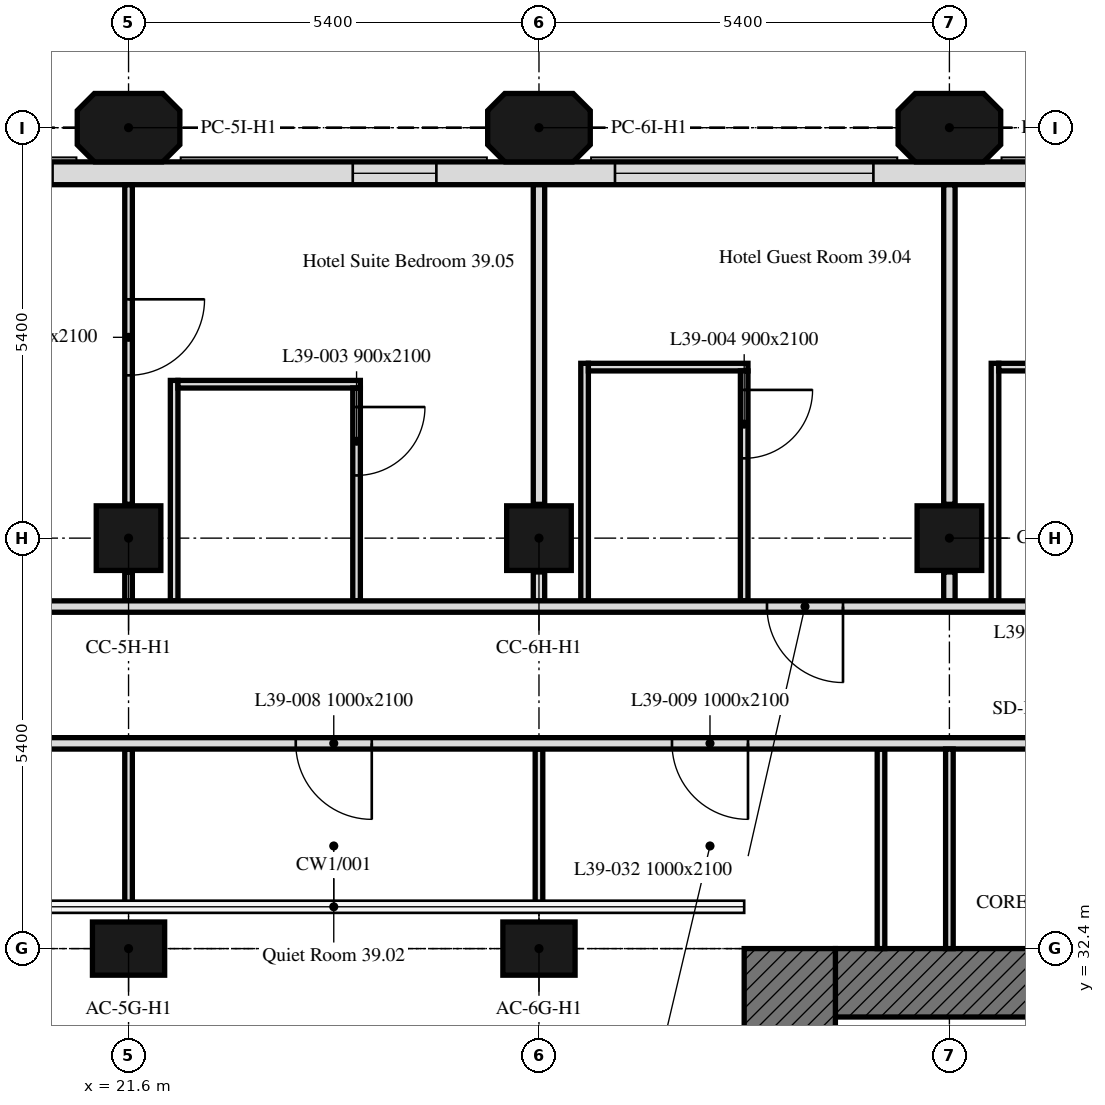
"""IFC4 building model, lengths in metres.
Left out: names, types, materials, properties, quantities, classifications, styles, units other than length and angle.
Written with IfcOpenShell. Run it as: python <this file> out.ifc"""

import sys

from ifc_helpers import new_model, si_unit, direction, frame, frame_2d, origin, origin_2d, place, context, subcontext, project, spatial, polyline, rectangle, outline, extrude, element, fill, save


model = new_model("IFC4")
c1 = context("Model", 3, precision=1e-05, world=origin(), true_north=direction((0.0, 1.0)))
c2 = subcontext(c1, "Body", "Model", "MODEL_VIEW")
j1 = project(units=[si_unit("LENGTHUNIT", "METRE"), si_unit("PLANEANGLEUNIT", "RADIAN")], contexts=[c1])
p1 = place(None, origin())
s1 = spatial("IfcSite", under=j1, at=p1, CompositionType="ELEMENT")
p2 = place(p1, origin())
s2 = spatial("IfcBuilding", under=s1, at=p2, CompositionType="ELEMENT")
p3 = place(p2, frame((0.0, 0.0, 166.0)))
s3 = spatial("IfcBuildingStorey", under=s2, at=p3, CompositionType="ELEMENT", Elevation=166.0)
for number, where, z_axis, x_axis in (
    (1, (21.6, 32.4, 0.0), (0.0, 0.0, 1.0), (1.0, 0.0, 0.0)),
    (2, (27.0, 32.4, 0.0), (0.0, 0.0, 1.0), (1.0, 0.0, 0.0)),
):
    element("IfcColumn", number, at=place(p3, frame(where, z_axis=z_axis, x_axis=x_axis)), inside=s3, PredefinedType="COLUMN", context=c2, shape_type="SweptSolid", body=[
        extrude(rectangle(XDim=0.95, YDim=0.7, at=origin_2d()), origin(), (0.0, 0.0, 1.0), 3.0),
    ])
for number, where, z_axis, x_axis in (
    (3, (21.6, 37.8, 0.0), (0.0, 0.0, 1.0), (1.0, 0.0, 0.0)),
    (4, (27.0, 37.8, 0.0), (0.0, 0.0, 1.0), (1.0, 0.0, 0.0)),
    (5, (32.4, 37.8, 0.0), (0.0, 0.0, 1.0), (1.0, 0.0, 0.0)),
):
    element("IfcColumn", number, at=place(p3, frame(where, z_axis=z_axis, x_axis=x_axis)), inside=s3, PredefinedType="COLUMN", context=c2, shape_type="SweptSolid", body=[
        extrude(rectangle(XDim=0.85, YDim=0.85, at=origin_2d()), origin(), (0.0, 0.0, 1.0), 3.0),
    ])
for number, where, z_axis, x_axis in (
    (6, (21.6, 43.2, 0.0), (0.0, 0.0, 1.0), (1.0, 0.0, 0.0)),
    (7, (27.0, 43.2, 0.0), (0.0, 0.0, 1.0), (1.0, 0.0, 0.0)),
    (8, (32.4, 43.2, 0.0), (0.0, 0.0, 1.0), (1.0, 0.0, 0.0)),
):
    element("IfcColumn", number, at=place(p3, frame(where, z_axis=z_axis, x_axis=x_axis)), inside=s3, PredefinedType="COLUMN", context=c2, shape_type="SweptSolid", body=[
        extrude(outline(polyline([(-0.45, -0.45), (0.45, -0.45), (0.675, -0.225), (0.675, 0.225), (0.45, 0.45), (-0.45, 0.45), (-0.675, 0.225), (-0.675, -0.225), (-0.45, -0.45)])), origin(), (0.0, 0.0, 1.0), 3.0),
    ])
p4 = place(p3, frame((43.014, 42.6, 0.0), z_axis=(0.0, 0.0, 1.0), x_axis=(-1.0, 0.0, 0.0)))
e9 = element("IfcWall", 9, at=p4, inside=s3, PredefinedType="SOLIDWALL", context=c2, shape_type="SweptSolid", body=[
    extrude(rectangle(XDim=32.027, YDim=0.3, at=frame_2d((16.014, 0.0))), origin(), (0.0, 0.0, 1.0), 3.0),
])
p5 = place(p4, frame((0.814, 0.0, 0.9)))
e10 = element("IfcOpeningElement", 10, at=p5, cuts=e9, PredefinedType="OPENING", context=c2, shape_type="SweptSolid", body=[
    extrude(rectangle(XDim=3.4, YDim=1.7, at=frame_2d((1.7, 0.85))), frame((0.0, 0.16, 0.0), z_axis=(0.0, -1.0, 0.0), x_axis=(1.0, 0.0, 0.0)), (0.0, 0.0, 1.0), 0.32),
])
p6 = place(p4, frame((6.564, 0.0, 0.9)))
e11 = element("IfcOpeningElement", 11, at=p6, cuts=e9, PredefinedType="OPENING", context=c2, shape_type="SweptSolid", body=[
    extrude(rectangle(XDim=1.1, YDim=1.7, at=frame_2d((0.55, 0.85))), frame((0.0, 0.16, 0.0), z_axis=(0.0, -1.0, 0.0), x_axis=(1.0, 0.0, 0.0)), (0.0, 0.0, 1.0), 0.32),
])
p7 = place(p4, frame((11.614, 0.0, 0.9)))
e12 = element("IfcOpeningElement", 12, at=p7, cuts=e9, PredefinedType="OPENING", context=c2, shape_type="SweptSolid", body=[
    extrude(rectangle(XDim=3.4, YDim=1.7, at=frame_2d((1.7, 0.85))), frame((0.0, 0.16, 0.0), z_axis=(0.0, -1.0, 0.0), x_axis=(1.0, 0.0, 0.0)), (0.0, 0.0, 1.0), 0.32),
])
p8 = place(p4, frame((17.364, 0.0, 0.9)))
e13 = element("IfcOpeningElement", 13, at=p8, cuts=e9, PredefinedType="OPENING", context=c2, shape_type="SweptSolid", body=[
    extrude(rectangle(XDim=1.1, YDim=1.7, at=frame_2d((0.55, 0.85))), frame((0.0, 0.16, 0.0), z_axis=(0.0, -1.0, 0.0), x_axis=(1.0, 0.0, 0.0)), (0.0, 0.0, 1.0), 0.32),
])
p9 = place(p4, frame((22.414, 0.0, 0.9)))
e14 = element("IfcOpeningElement", 14, at=p9, cuts=e9, PredefinedType="OPENING", context=c2, shape_type="SweptSolid", body=[
    extrude(rectangle(XDim=3.4, YDim=1.7, at=frame_2d((1.7, 0.85))), frame((0.0, 0.16, 0.0), z_axis=(0.0, -1.0, 0.0), x_axis=(1.0, 0.0, 0.0)), (0.0, 0.0, 1.0), 0.32),
])
p10 = place(p4, frame((28.164, 0.0, 0.9)))
e15 = element("IfcOpeningElement", 15, at=p10, cuts=e9, PredefinedType="OPENING", context=c2, shape_type="SweptSolid", body=[
    extrude(rectangle(XDim=1.1, YDim=1.7, at=frame_2d((0.55, 0.85))), frame((0.0, 0.16, 0.0), z_axis=(0.0, -1.0, 0.0), x_axis=(1.0, 0.0, 0.0)), (0.0, 0.0, 1.0), 0.32),
])
p11 = place(p3, frame((30.9, 31.95, 0.0), z_axis=(0.0, 0.0, 1.0), x_axis=(1.0, 0.0, 0.0)))
e16 = element("IfcWall", 16, at=p11, inside=s3, PredefinedType="SOLIDWALL", context=c2, shape_type="SweptSolid", body=[
    extrude(rectangle(XDim=11.1, YDim=0.9, at=frame_2d((5.55, 0.0))), origin(), (0.0, 0.0, 1.0), 3.0),
])
p12 = place(p11, frame((5.55, 0.0, 0.0)))
e17 = element("IfcOpeningElement", 17, at=p12, cuts=e16, PredefinedType="OPENING", context=c2, shape_type="SweptSolid", body=[
    extrude(rectangle(XDim=2.0, YDim=2.4, at=frame_2d((1.0, 1.2))), frame((0.0, 0.45, 0.0), z_axis=(0.0, -1.0, 0.0), x_axis=(1.0, 0.0, 0.0)), (0.0, 0.0, 1.0), 0.9),
])
p13 = place(p3, frame((30.3, 16.2, 0.0), z_axis=(0.0, 0.0, 1.0), x_axis=(0.0, 1.0, 0.0)))
e18 = element("IfcWall", 18, at=p13, inside=s3, PredefinedType="SOLIDWALL", context=c2, shape_type="SweptSolid", body=[
    extrude(rectangle(XDim=16.2, YDim=1.2, at=frame_2d((8.1, 0.0))), origin(), (0.0, 0.0, 1.0), 3.0),
])
p14 = place(p3, frame((21.6, 42.449, 0.0), z_axis=(0.0, 0.0, 1.0), x_axis=(0.0, -1.0, 0.0)))
e19 = element("IfcWall", 19, at=p14, inside=s3, PredefinedType="PARTITIONING", context=c2, shape_type="SweptSolid", body=[
    extrude(rectangle(XDim=4.204, YDim=0.1, at=frame_2d((2.102, 0.0))), origin(), (0.0, 0.0, 1.0), 3.0),
])
p15 = place(p14, frame((1.507, 0.0, 0.0)))
e20 = element("IfcOpeningElement", 20, at=p15, cuts=e19, PredefinedType="OPENING", context=c2, shape_type="SweptSolid", body=[
    extrude(rectangle(XDim=1.0, YDim=2.1, at=frame_2d((0.5, 1.05))), frame((0.0, 0.05, 0.0), z_axis=(0.0, -1.0, 0.0), x_axis=(1.0, 0.0, 0.0)), (0.0, 0.0, 1.0), 0.1),
])
p16 = place(p3, frame((21.6, 37.355, 0.0), z_axis=(0.0, 0.0, 1.0), x_axis=(0.0, -1.0, 0.0)))
e21 = element("IfcWall", 21, at=p16, inside=s3, PredefinedType="PARTITIONING", context=c2, shape_type="SweptSolid", body=[
    extrude(rectangle(XDim=0.38, YDim=0.1, at=frame_2d((0.19, 0.0))), origin(), (0.0, 0.0, 1.0), 3.0),
])
p17 = place(p3, frame((22.2, 36.975, 0.0), z_axis=(0.0, 0.0, 1.0), x_axis=(0.0, 1.0, 0.0)))
e22 = element("IfcWall", 22, at=p17, inside=s3, PredefinedType="PARTITIONING", context=c2, shape_type="SweptSolid", body=[
    extrude(rectangle(XDim=2.9, YDim=0.1, at=frame_2d((1.45, 0.0))), origin(), (0.0, 0.0, 1.0), 3.0),
])
p18 = place(p3, frame((22.25, 39.825, 0.0), z_axis=(0.0, 0.0, 1.0), x_axis=(1.0, 0.0, 0.0)))
e23 = element("IfcWall", 23, at=p18, inside=s3, PredefinedType="PARTITIONING", context=c2, shape_type="SweptSolid", body=[
    extrude(rectangle(XDim=2.4, YDim=0.1, at=frame_2d((1.2, 0.0))), origin(), (0.0, 0.0, 1.0), 3.0),
])
p19 = place(p3, frame((24.6, 39.775, 0.0), z_axis=(0.0, 0.0, 1.0), x_axis=(0.0, -1.0, 0.0)))
e24 = element("IfcWall", 24, at=p19, inside=s3, PredefinedType="PARTITIONING", context=c2, shape_type="SweptSolid", body=[
    extrude(rectangle(XDim=2.8, YDim=0.1, at=frame_2d((1.4, 0.0))), origin(), (0.0, 0.0, 1.0), 3.0),
])
p20 = place(p19, frame((0.25, 0.0, 0.0)))
e25 = element("IfcOpeningElement", 25, at=p20, cuts=e24, PredefinedType="OPENING", context=c2, shape_type="SweptSolid", body=[
    extrude(rectangle(XDim=0.9, YDim=2.1, at=frame_2d((0.45, 1.05))), frame((0.0, 0.05, 0.0), z_axis=(0.0, -1.0, 0.0), x_axis=(1.0, 0.0, 0.0)), (0.0, 0.0, 1.0), 0.1),
])
p21 = place(p3, frame((27.0, 36.975, 0.0), z_axis=(0.0, 0.0, 1.0), x_axis=(0.0, 1.0, 0.0)))
e26 = element("IfcWall", 26, at=p21, inside=s3, PredefinedType="PARTITIONING", context=c2, shape_type="SweptSolid", body=[
    extrude(rectangle(XDim=0.38, YDim=0.15, at=frame_2d((0.19, 0.0))), origin(), (0.0, 0.0, 1.0), 3.0),
])
p22 = place(p3, frame((27.0, 38.245, 0.0), z_axis=(0.0, 0.0, 1.0), x_axis=(0.0, 1.0, 0.0)))
e27 = element("IfcWall", 27, at=p22, inside=s3, PredefinedType="PARTITIONING", context=c2, shape_type="SweptSolid", body=[
    extrude(rectangle(XDim=4.204, YDim=0.15, at=frame_2d((2.102, 0.0))), origin(), (0.0, 0.0, 1.0), 3.0),
])
p23 = place(p3, frame((27.6, 36.975, 0.0), z_axis=(0.0, 0.0, 1.0), x_axis=(0.0, 1.0, 0.0)))
e28 = element("IfcWall", 28, at=p23, inside=s3, PredefinedType="PARTITIONING", context=c2, shape_type="SweptSolid", body=[
    extrude(rectangle(XDim=3.125, YDim=0.1, at=frame_2d((1.562, 0.0))), origin(), (0.0, 0.0, 1.0), 3.0),
])
p24 = place(p3, frame((27.65, 40.05, 0.0), z_axis=(0.0, 0.0, 1.0), x_axis=(1.0, 0.0, 0.0)))
e29 = element("IfcWall", 29, at=p24, inside=s3, PredefinedType="PARTITIONING", context=c2, shape_type="SweptSolid", body=[
    extrude(rectangle(XDim=2.1, YDim=0.1, at=frame_2d((1.05, 0.0))), origin(), (0.0, 0.0, 1.0), 3.0),
])
p25 = place(p3, frame((29.7, 40.0, 0.0), z_axis=(0.0, 0.0, 1.0), x_axis=(0.0, -1.0, 0.0)))
e30 = element("IfcWall", 30, at=p25, inside=s3, PredefinedType="PARTITIONING", context=c2, shape_type="SweptSolid", body=[
    extrude(rectangle(XDim=3.025, YDim=0.1, at=frame_2d((1.512, 0.0))), origin(), (0.0, 0.0, 1.0), 3.0),
])
p26 = place(p25, frame((0.25, 0.0, 0.0)))
e31 = element("IfcOpeningElement", 31, at=p26, cuts=e30, PredefinedType="OPENING", context=c2, shape_type="SweptSolid", body=[
    extrude(rectangle(XDim=0.9, YDim=2.1, at=frame_2d((0.45, 1.05))), frame((0.0, 0.05, 0.0), z_axis=(0.0, -1.0, 0.0), x_axis=(1.0, 0.0, 0.0)), (0.0, 0.0, 1.0), 0.1),
])
p27 = place(p3, frame((32.4, 36.975, 0.0), z_axis=(0.0, 0.0, 1.0), x_axis=(0.0, 1.0, 0.0)))
e32 = element("IfcWall", 32, at=p27, inside=s3, PredefinedType="PARTITIONING", context=c2, shape_type="SweptSolid", body=[
    extrude(rectangle(XDim=0.38, YDim=0.15, at=frame_2d((0.19, 0.0))), origin(), (0.0, 0.0, 1.0), 3.0),
])
p28 = place(p3, frame((32.4, 38.245, 0.0), z_axis=(0.0, 0.0, 1.0), x_axis=(0.0, 1.0, 0.0)))
e33 = element("IfcWall", 33, at=p28, inside=s3, PredefinedType="PARTITIONING", context=c2, shape_type="SweptSolid", body=[
    extrude(rectangle(XDim=4.204, YDim=0.15, at=frame_2d((2.102, 0.0))), origin(), (0.0, 0.0, 1.0), 3.0),
])
p29 = place(p3, frame((33.0, 36.975, 0.0), z_axis=(0.0, 0.0, 1.0), x_axis=(0.0, 1.0, 0.0)))
e34 = element("IfcWall", 34, at=p29, inside=s3, PredefinedType="PARTITIONING", context=c2, shape_type="SweptSolid", body=[
    extrude(rectangle(XDim=3.125, YDim=0.1, at=frame_2d((1.562, 0.0))), origin(), (0.0, 0.0, 1.0), 3.0),
])
p30 = place(p3, frame((33.05, 40.05, 0.0), z_axis=(0.0, 0.0, 1.0), x_axis=(1.0, 0.0, 0.0)))
e35 = element("IfcWall", 35, at=p30, inside=s3, PredefinedType="PARTITIONING", context=c2, shape_type="SweptSolid", body=[
    extrude(rectangle(XDim=2.1, YDim=0.1, at=frame_2d((1.05, 0.0))), origin(), (0.0, 0.0, 1.0), 3.0),
])
p31 = place(p3, frame((47.849, 36.9, 0.0), z_axis=(0.0, 0.0, 1.0), x_axis=(-1.0, 0.0, 0.0)))
e36 = element("IfcWall", 36, at=p31, inside=s3, PredefinedType="PARTITIONING", context=c2, shape_type="SweptSolid", body=[
    extrude(rectangle(XDim=41.698, YDim=0.15, at=frame_2d((20.849, 0.0))), origin(), (0.0, 0.0, 1.0), 3.0),
])
p32 = place(p31, frame((39.249, 0.0, 0.0)))
e37 = element("IfcOpeningElement", 37, at=p32, cuts=e36, PredefinedType="OPENING", context=c2, shape_type="SweptSolid", body=[
    extrude(rectangle(XDim=1.0, YDim=2.1, at=frame_2d((0.5, 1.05))), frame((0.0, 0.075, 0.0), z_axis=(0.0, -1.0, 0.0), x_axis=(1.0, 0.0, 0.0)), (0.0, 0.0, 1.0), 0.15),
])
p33 = place(p31, frame((28.449, 0.0, 0.0)))
e38 = element("IfcOpeningElement", 38, at=p33, cuts=e36, PredefinedType="OPENING", context=c2, shape_type="SweptSolid", body=[
    extrude(rectangle(XDim=1.0, YDim=2.1, at=frame_2d((0.5, 1.05))), frame((0.0, 0.075, 0.0), z_axis=(0.0, -1.0, 0.0), x_axis=(1.0, 0.0, 0.0)), (0.0, 0.0, 1.0), 0.15),
])
p34 = place(p31, frame((16.849, 0.0, 0.0)))
e39 = element("IfcOpeningElement", 39, at=p34, cuts=e36, PredefinedType="OPENING", context=c2, shape_type="SweptSolid", body=[
    extrude(rectangle(XDim=1.0, YDim=2.1, at=frame_2d((0.5, 1.05))), frame((0.0, 0.075, 0.0), z_axis=(0.0, -1.0, 0.0), x_axis=(1.0, 0.0, 0.0)), (0.0, 0.0, 1.0), 0.15),
])
p35 = place(p31, frame((11.449, 0.0, 0.0)))
e40 = element("IfcOpeningElement", 40, at=p35, cuts=e36, PredefinedType="OPENING", context=c2, shape_type="SweptSolid", body=[
    extrude(rectangle(XDim=1.0, YDim=2.1, at=frame_2d((0.5, 1.05))), frame((0.0, 0.075, 0.0), z_axis=(0.0, -1.0, 0.0), x_axis=(1.0, 0.0, 0.0)), (0.0, 0.0, 1.0), 0.15),
])
p36 = place(p31, frame((2.744, 0.0, 0.0)))
e41 = element("IfcOpeningElement", 41, at=p36, cuts=e36, PredefinedType="OPENING", context=c2, shape_type="SweptSolid", body=[
    extrude(rectangle(XDim=1.0, YDim=2.1, at=frame_2d((0.5, 1.05))), frame((0.0, 0.075, 0.0), z_axis=(0.0, -1.0, 0.0), x_axis=(1.0, 0.0, 0.0)), (0.0, 0.0, 1.0), 0.15),
])
for number, where, z_axis, x_axis in (
    (42, (21.6, 35.025, 0.0), (0.0, 0.0, 1.0), (0.0, -1.0, 0.0)),
    (43, (27.0, 32.895, 0.0), (0.0, 0.0, 1.0), (0.0, 1.0, 0.0)),
):
    element("IfcWall", number, at=place(p3, frame(where, z_axis=z_axis, x_axis=x_axis)), inside=s3, PredefinedType="PARTITIONING", context=c2, shape_type="SweptSolid", body=[
        extrude(rectangle(XDim=2.13, YDim=0.1, at=frame_2d((1.065, 0.0))), origin(), (0.0, 0.0, 1.0), 3.0),
    ])
p37 = place(p3, frame((31.5, 32.4, 0.0), z_axis=(0.0, 0.0, 1.0), x_axis=(0.0, 1.0, 0.0)))
e44 = element("IfcWall", 44, at=p37, inside=s3, PredefinedType="PARTITIONING", context=c2, shape_type="SweptSolid", body=[
    extrude(rectangle(XDim=2.625, YDim=0.1, at=frame_2d((1.312, 0.0))), origin(), (0.0, 0.0, 1.0), 3.0),
])
p38 = place(p3, frame((43.275, 35.1, 0.0), z_axis=(0.0, 0.0, 1.0), x_axis=(-1.0, 0.0, 0.0)))
e45 = element("IfcWall", 45, at=p38, inside=s3, PredefinedType="PARTITIONING", context=c2, shape_type="SweptSolid", body=[
    extrude(rectangle(XDim=37.124, YDim=0.15, at=frame_2d((18.562, 0.0))), origin(), (0.0, 0.0, 1.0), 3.0),
])
p39 = place(p38, frame((24.775, 0.0, 0.0)))
e46 = element("IfcOpeningElement", 46, at=p39, cuts=e45, PredefinedType="OPENING", context=c2, shape_type="SweptSolid", body=[
    extrude(rectangle(XDim=1.0, YDim=2.1, at=frame_2d((0.5, 1.05))), frame((0.0, 0.075, 0.0), z_axis=(0.0, -1.0, 0.0), x_axis=(1.0, 0.0, 0.0)), (0.0, 0.0, 1.0), 0.15),
])
p40 = place(p38, frame((18.475, 0.0, 0.0)))
e47 = element("IfcOpeningElement", 47, at=p40, cuts=e45, PredefinedType="OPENING", context=c2, shape_type="SweptSolid", body=[
    extrude(rectangle(XDim=1.0, YDim=2.1, at=frame_2d((0.5, 1.05))), frame((0.0, 0.075, 0.0), z_axis=(0.0, -1.0, 0.0), x_axis=(1.0, 0.0, 0.0)), (0.0, 0.0, 1.0), 0.15),
])
p41 = place(p38, frame((13.525, 0.0, 0.0)))
e48 = element("IfcOpeningElement", 48, at=p41, cuts=e45, PredefinedType="OPENING", context=c2, shape_type="SweptSolid", body=[
    extrude(rectangle(XDim=1.0, YDim=2.1, at=frame_2d((0.5, 1.05))), frame((0.0, 0.075, 0.0), z_axis=(0.0, -1.0, 0.0), x_axis=(1.0, 0.0, 0.0)), (0.0, 0.0, 1.0), 0.15),
])
p42 = place(p38, frame((34.095, 0.0, 0.0)))
e49 = element("IfcOpeningElement", 49, at=p42, cuts=e45, PredefinedType="OPENING", context=c2, shape_type="SweptSolid", body=[
    extrude(rectangle(XDim=1.0, YDim=2.1, at=frame_2d((0.5, 1.05))), frame((0.0, 0.075, 0.0), z_axis=(0.0, -1.0, 0.0), x_axis=(1.0, 0.0, 0.0)), (0.0, 0.0, 1.0), 0.15),
])
p43 = place(p38, frame((8.75, 0.0, 0.0)))
e50 = element("IfcOpeningElement", 50, at=p43, cuts=e45, PredefinedType="OPENING", context=c2, shape_type="SweptSolid", body=[
    extrude(rectangle(XDim=1.0, YDim=2.1, at=frame_2d((0.5, 1.05))), frame((0.0, 0.075, 0.0), z_axis=(0.0, -1.0, 0.0), x_axis=(1.0, 0.0, 0.0)), (0.0, 0.0, 1.0), 0.15),
])
p44 = place(p38, frame((1.55, 0.0, 0.0)))
e51 = element("IfcOpeningElement", 51, at=p44, cuts=e45, PredefinedType="OPENING", context=c2, shape_type="SweptSolid", body=[
    extrude(rectangle(XDim=1.0, YDim=2.1, at=frame_2d((0.5, 1.05))), frame((0.0, 0.075, 0.0), z_axis=(0.0, -1.0, 0.0), x_axis=(1.0, 0.0, 0.0)), (0.0, 0.0, 1.0), 0.15),
])
p45 = place(p38, frame((28.2, 0.0, 0.0)))
e52 = element("IfcOpeningElement", 52, at=p45, cuts=e45, PredefinedType="OPENING", context=c2, shape_type="SweptSolid", body=[
    extrude(rectangle(XDim=1.0, YDim=2.1, at=frame_2d((0.5, 1.05))), frame((0.0, 0.075, 0.0), z_axis=(0.0, -1.0, 0.0), x_axis=(1.0, 0.0, 0.0)), (0.0, 0.0, 1.0), 0.15),
])
p46 = place(p38, frame((30.625, 0.0, 0.0)))
e53 = element("IfcOpeningElement", 53, at=p46, cuts=e45, PredefinedType="OPENING", context=c2, shape_type="SweptSolid", body=[
    extrude(rectangle(XDim=1.8, YDim=2.4, at=frame_2d((0.9, 1.2))), frame((0.0, 0.075, 0.0), z_axis=(0.0, -1.0, 0.0), x_axis=(1.0, 0.0, 0.0)), (0.0, 0.0, 1.0), 0.15),
])
p47 = place(p38, frame((5.525, 0.0, 0.0)))
e54 = element("IfcOpeningElement", 54, at=p47, cuts=e45, PredefinedType="OPENING", context=c2, shape_type="SweptSolid", body=[
    extrude(rectangle(XDim=1.8, YDim=2.4, at=frame_2d((0.9, 1.2))), frame((0.0, 0.075, 0.0), z_axis=(0.0, -1.0, 0.0), x_axis=(1.0, 0.0, 0.0)), (0.0, 0.0, 1.0), 0.15),
])
p48 = place(p3, frame((32.4, 35.025, 0.0), z_axis=(0.0, 0.0, 1.0), x_axis=(0.0, -1.0, 0.0)))
e55 = element("IfcWall", 55, at=p48, inside=s3, PredefinedType="PARTITIONING", context=c2, shape_type="SweptSolid", body=[
    extrude(rectangle(XDim=2.625, YDim=0.1, at=frame_2d((1.312, 0.0))), origin(), (0.0, 0.0, 1.0), 3.0),
])
p49 = place(p7, origin())
e56 = element("IfcWindow", 56, at=p49, inside=s3, PartitioningType="SINGLE_PANEL", PredefinedType="WINDOW", context=c2, shape_type="SweptSolid", body=[
    extrude(rectangle(XDim=3.4, YDim=1.7, at=frame_2d((1.7, 0.85))), frame((0.0, 0.03, 0.0), z_axis=(0.0, -1.0, 0.0), x_axis=(1.0, 0.0, 0.0)), (0.0, 0.0, 1.0), 0.06),
])
fill(e12, e56)
p50 = place(p8, origin())
e57 = element("IfcWindow", 57, at=p50, inside=s3, PartitioningType="SINGLE_PANEL", PredefinedType="WINDOW", context=c2, shape_type="SweptSolid", body=[
    extrude(rectangle(XDim=1.1, YDim=1.7, at=frame_2d((0.55, 0.85))), frame((0.0, 0.03, 0.0), z_axis=(0.0, -1.0, 0.0), x_axis=(1.0, 0.0, 0.0)), (0.0, 0.0, 1.0), 0.06),
])
fill(e13, e57)
p51 = place(p20, origin())
e58 = element("IfcDoor", 58, at=p51, inside=s3, OperationType="SINGLE_SWING_RIGHT", PredefinedType="DOOR", context=c2, shape_type="SweptSolid", body=[
    extrude(rectangle(XDim=0.9, YDim=2.1, at=frame_2d((0.45, 1.05))), frame((0.0, 0.025, 0.0), z_axis=(0.0, -1.0, 0.0), x_axis=(1.0, 0.0, 0.0)), (0.0, 0.0, 1.0), 0.05),
])
fill(e25, e58)
p52 = place(p26, origin())
e59 = element("IfcDoor", 59, at=p52, inside=s3, OperationType="SINGLE_SWING_LEFT", PredefinedType="DOOR", context=c2, shape_type="SweptSolid", body=[
    extrude(rectangle(XDim=0.9, YDim=2.1, at=frame_2d((0.45, 1.05))), frame((0.0, 0.025, 0.0), z_axis=(0.0, -1.0, 0.0), x_axis=(1.0, 0.0, 0.0)), (0.0, 0.0, 1.0), 0.05),
])
fill(e31, e59)
p53 = place(p40, origin())
e60 = element("IfcDoor", 60, at=p53, inside=s3, OperationType="SINGLE_SWING_RIGHT", PredefinedType="DOOR", context=c2, shape_type="SweptSolid", body=[
    extrude(rectangle(XDim=1.0, YDim=2.1, at=frame_2d((0.5, 1.05))), frame((0.0, 0.025, 0.0), z_axis=(0.0, -1.0, 0.0), x_axis=(1.0, 0.0, 0.0)), (0.0, 0.0, 1.0), 0.05),
])
fill(e47, e60)
p54 = place(p41, origin())
e61 = element("IfcDoor", 61, at=p54, inside=s3, OperationType="SINGLE_SWING_RIGHT", PredefinedType="DOOR", context=c2, shape_type="SweptSolid", body=[
    extrude(rectangle(XDim=1.0, YDim=2.1, at=frame_2d((0.5, 1.05))), frame((0.0, 0.025, 0.0), z_axis=(0.0, -1.0, 0.0), x_axis=(1.0, 0.0, 0.0)), (0.0, 0.0, 1.0), 0.05),
])
fill(e48, e61)
p55 = place(p15, origin())
e62 = element("IfcDoor", 62, at=p55, inside=s3, OperationType="SINGLE_SWING_RIGHT", PredefinedType="DOOR", context=c2, shape_type="SweptSolid", body=[
    extrude(rectangle(XDim=1.0, YDim=2.1, at=frame_2d((0.5, 1.05))), frame((0.0, 0.025, 0.0), z_axis=(0.0, -1.0, 0.0), x_axis=(1.0, 0.0, 0.0)), (0.0, 0.0, 1.0), 0.05),
])
fill(e20, e62)
p56 = place(p34, origin())
e63 = element("IfcDoor", 63, at=p56, inside=s3, OperationType="SINGLE_SWING_LEFT", PredefinedType="DOOR", context=c2, shape_type="SweptSolid", body=[
    extrude(rectangle(XDim=1.0, YDim=2.1, at=frame_2d((0.5, 1.05))), frame((0.0, 0.025, 0.0), z_axis=(0.0, -1.0, 0.0), x_axis=(1.0, 0.0, 0.0)), (0.0, 0.0, 1.0), 0.05),
])
fill(e39, e63)
save(model, sys.argv[1])
